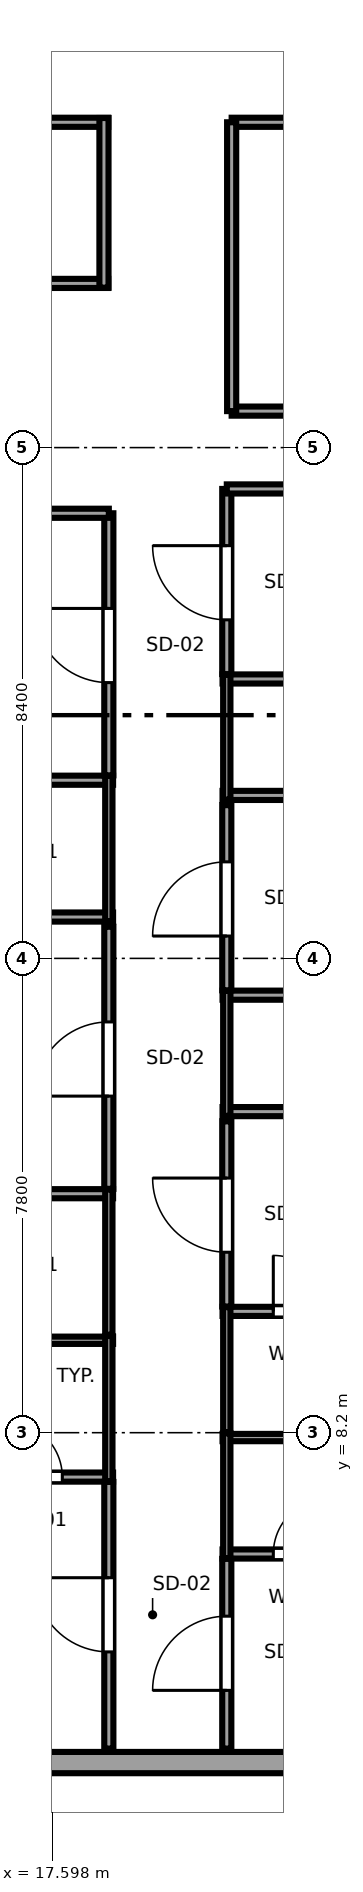
"""IFC4 building model, lengths in metres.
Left out: names, types, materials, properties, quantities, classifications, styles, units other than length and angle.
Written with IfcOpenShell. Run it as: python <this file> out.ifc"""

import sys

from ifc_helpers import new_model, si_unit, direction, frame, frame_2d, origin, place, context, subcontext, project, spatial, rectangle, extrude, source, transform, mapped, element, fill, save


model = new_model("IFC4")
c1 = context("Model", 3, precision=1e-05, world=origin(), true_north=direction((0.0, 1.0)))
c2 = subcontext(c1, "Body", "Model", "MODEL_VIEW")
j1 = project(units=[si_unit("LENGTHUNIT", "METRE"), si_unit("PLANEANGLEUNIT", "RADIAN")], contexts=[c1])
p1 = place(None, origin())
s1 = spatial("IfcSite", under=j1, at=p1, CompositionType="ELEMENT")
p2 = place(p1, origin())
s2 = spatial("IfcBuilding", under=s1, at=p2, CompositionType="ELEMENT")
p3 = place(p2, frame((0.0, 0.0, 231.0)))
s3 = spatial("IfcBuildingStorey", under=s2, at=p3, CompositionType="ELEMENT", Elevation=231.0)
p4 = place(p3, frame((7.017, 2.775, 0.0), z_axis=(0.0, 0.0, 1.0), x_axis=(1.0, 0.0, 0.0)))
e1 = element("IfcWall", 1, at=p4, inside=s3, PredefinedType="SOLIDWALL", context=c2, shape_type="SweptSolid", body=[
    extrude(rectangle(XDim=28.366, YDim=0.35, at=frame_2d((14.183, 0.0))), origin(), (0.0, 0.0, 1.0), 3.37),
])
p5 = place(p4, frame((1.514, 0.0, 0.68)))
e2 = element("IfcOpeningElement", 2, at=p5, cuts=e1, PredefinedType="OPENING", context=c2, shape_type="SweptSolid", body=[
    extrude(rectangle(XDim=2.7, YDim=1.95, at=frame_2d((1.35, 0.975))), frame((0.0, 0.185, 0.0), z_axis=(0.0, -1.0, 0.0), x_axis=(1.0, 0.0, 0.0)), (0.0, 0.0, 1.0), 0.37),
])
p6 = place(p4, frame((15.647, 0.0, 0.68)))
e3 = element("IfcOpeningElement", 3, at=p6, cuts=e1, PredefinedType="OPENING", context=c2, shape_type="SweptSolid", body=[
    extrude(rectangle(XDim=2.7, YDim=1.95, at=frame_2d((1.35, 0.975))), frame((0.0, 0.185, 0.0), z_axis=(0.0, -1.0, 0.0), x_axis=(1.0, 0.0, 0.0)), (0.0, 0.0, 1.0), 0.37),
])
p7 = place(p4, frame((24.152, 0.0, 0.68)))
e4 = element("IfcOpeningElement", 4, at=p7, cuts=e1, PredefinedType="OPENING", context=c2, shape_type="SweptSolid", body=[
    extrude(rectangle(XDim=2.7, YDim=1.95, at=frame_2d((1.35, 0.975))), frame((0.0, 0.185, 0.0), z_axis=(0.0, -1.0, 0.0), x_axis=(1.0, 0.0, 0.0)), (0.0, 0.0, 1.0), 0.37),
])
p8 = place(p3, frame((16.01, 7.47, 0.0), z_axis=(0.0, 0.0, 1.0), x_axis=(1.0, 0.0, 0.0)))
e5 = element("IfcWall", 5, at=p8, inside=s3, PredefinedType="PARTITIONING", context=c2, shape_type="SweptSolid", body=[
    extrude(rectangle(XDim=2.59, YDim=0.15, at=frame_2d((1.295, 0.0))), origin(), (0.0, 0.0, 1.0), 3.37),
])
p9 = place(p8, frame((0.835, 0.0, 0.0)))
e6 = element("IfcOpeningElement", 6, at=p9, cuts=e5, PredefinedType="OPENING", context=c2, shape_type="SweptSolid", body=[
    extrude(rectangle(XDim=0.92, YDim=2.01, at=frame_2d((0.46, 1.005))), frame((0.0, 0.085, 0.0), z_axis=(0.0, -1.0, 0.0), x_axis=(1.0, 0.0, 0.0)), (0.0, 0.0, 1.0), 0.17),
])
p10 = place(p3, frame((16.01, 9.72, 0.0), z_axis=(0.0, 0.0, 1.0), x_axis=(1.0, 0.0, 0.0)))
e7 = element("IfcWall", 7, at=p10, inside=s3, PredefinedType="PLUMBINGWALL", context=c2, shape_type="SweptSolid", body=[
    extrude(rectangle(XDim=2.59, YDim=0.12, at=frame_2d((1.295, 0.0))), origin(), (0.0, 0.0, 1.0), 3.37),
])
p11 = place(p3, frame((18.53, 7.4, 0.0), z_axis=(0.0, 0.0, 1.0), x_axis=(0.0, 1.0, 0.0)))
e8 = element("IfcWall", 8, at=p11, inside=s3, PredefinedType="PLUMBINGWALL", context=c2, shape_type="SweptSolid", body=[
    extrude(rectangle(XDim=2.39, YDim=0.12, at=frame_2d((1.195, 0.0))), origin(), (0.0, 0.0, 1.0), 3.37),
])
p12 = place(p3, frame((16.01, 12.13, 0.0), z_axis=(0.0, 0.0, 1.0), x_axis=(1.0, 0.0, 0.0)))
e9 = element("IfcWall", 9, at=p12, inside=s3, PredefinedType="PARTITIONING", context=c2, shape_type="SweptSolid", body=[
    extrude(rectangle(XDim=2.59, YDim=0.15, at=frame_2d((1.295, 0.0))), origin(), (0.0, 0.0, 1.0), 3.37),
])
p13 = place(p3, frame((18.53, 9.81, 0.0), z_axis=(0.0, 0.0, 1.0), x_axis=(0.0, 1.0, 0.0)))
e10 = element("IfcWall", 10, at=p13, inside=s3, PredefinedType="PLUMBINGWALL", context=c2, shape_type="SweptSolid", body=[
    extrude(rectangle(XDim=2.39, YDim=0.12, at=frame_2d((1.195, 0.0))), origin(), (0.0, 0.0, 1.0), 3.37),
])
p14 = place(p3, frame((3.005, 16.68, 0.0), z_axis=(0.0, 0.0, 1.0), x_axis=(1.0, 0.0, 0.0)))
e11 = element("IfcWall", 11, at=p14, inside=s3, PredefinedType="PARTITIONING", context=c2, shape_type="SweptSolid", body=[
    extrude(rectangle(XDim=15.595, YDim=0.15, at=frame_2d((7.798, 0.0))), origin(), (0.0, 0.0, 1.0), 3.37),
])
p15 = place(p3, frame((16.01, 18.93, 0.0), z_axis=(0.0, 0.0, 1.0), x_axis=(1.0, 0.0, 0.0)))
e12 = element("IfcWall", 12, at=p15, inside=s3, PredefinedType="PARTITIONING", context=c2, shape_type="SweptSolid", body=[
    extrude(rectangle(XDim=2.59, YDim=0.15, at=frame_2d((1.295, 0.0))), origin(), (0.0, 0.0, 1.0), 3.37),
])
p16 = place(p3, frame((18.53, 16.61, 0.0), z_axis=(0.0, 0.0, 1.0), x_axis=(0.0, 1.0, 0.0)))
e13 = element("IfcWall", 13, at=p16, inside=s3, PredefinedType="PLUMBINGWALL", context=c2, shape_type="SweptSolid", body=[
    extrude(rectangle(XDim=2.39, YDim=0.12, at=frame_2d((1.195, 0.0))), origin(), (0.0, 0.0, 1.0), 3.37),
])
p17 = place(p3, frame((20.4, 6.205, 0.0), z_axis=(0.0, 0.0, 1.0), x_axis=(1.0, 0.0, 0.0)))
e14 = element("IfcWall", 14, at=p17, inside=s3, PredefinedType="PARTITIONING", context=c2, shape_type="SweptSolid", body=[
    extrude(rectangle(XDim=2.59, YDim=0.15, at=frame_2d((1.295, 0.0))), origin(), (0.0, 0.0, 1.0), 3.37),
])
p18 = place(p17, frame((0.835, 0.0, 0.0)))
e15 = element("IfcOpeningElement", 15, at=p18, cuts=e14, PredefinedType="OPENING", context=c2, shape_type="SweptSolid", body=[
    extrude(rectangle(XDim=0.92, YDim=2.01, at=frame_2d((0.46, 1.005))), frame((0.0, 0.085, 0.0), z_axis=(0.0, -1.0, 0.0), x_axis=(1.0, 0.0, 0.0)), (0.0, 0.0, 1.0), 0.17),
])
p19 = place(p3, frame((20.4, 8.12, 0.0), z_axis=(0.0, 0.0, 1.0), x_axis=(1.0, 0.0, 0.0)))
e16 = element("IfcWall", 16, at=p19, inside=s3, PredefinedType="PLUMBINGWALL", context=c2, shape_type="SweptSolid", body=[
    extrude(rectangle(XDim=2.59, YDim=0.12, at=frame_2d((1.295, 0.0))), origin(), (0.0, 0.0, 1.0), 2.758),
])
p20 = place(p3, frame((20.47, 6.135, 0.0), z_axis=(0.0, 0.0, 1.0), x_axis=(0.0, 1.0, 0.0)))
e17 = element("IfcWall", 17, at=p20, inside=s3, PredefinedType="PLUMBINGWALL", context=c2, shape_type="SweptSolid", body=[
    extrude(rectangle(XDim=2.055, YDim=0.12, at=frame_2d((1.027, 0.0))), origin(), (0.0, 0.0, 1.0), 3.37),
])
p21 = place(p3, frame((20.4, 10.195, 0.0), z_axis=(0.0, 0.0, 1.0), x_axis=(1.0, 0.0, 0.0)))
e18 = element("IfcWall", 18, at=p21, inside=s3, PredefinedType="PARTITIONING", context=c2, shape_type="SweptSolid", body=[
    extrude(rectangle(XDim=2.59, YDim=0.15, at=frame_2d((1.295, 0.0))), origin(), (0.0, 0.0, 1.0), 3.37),
])
p22 = place(p21, frame((0.835, 0.0, 0.0)))
e19 = element("IfcOpeningElement", 19, at=p22, cuts=e18, PredefinedType="OPENING", context=c2, shape_type="SweptSolid", body=[
    extrude(rectangle(XDim=0.92, YDim=2.01, at=frame_2d((0.46, 1.005))), frame((0.0, 0.085, 0.0), z_axis=(0.0, -1.0, 0.0), x_axis=(1.0, 0.0, 0.0)), (0.0, 0.0, 1.0), 0.17),
])
p23 = place(p3, frame((20.47, 8.21, 0.0), z_axis=(0.0, 0.0, 1.0), x_axis=(0.0, 1.0, 0.0)))
e20 = element("IfcWall", 20, at=p23, inside=s3, PredefinedType="PLUMBINGWALL", context=c2, shape_type="SweptSolid", body=[
    extrude(rectangle(XDim=2.055, YDim=0.12, at=frame_2d((1.027, 0.0))), origin(), (0.0, 0.0, 1.0), 3.37),
])
p24 = place(p3, frame((20.4, 13.48, 0.0), z_axis=(0.0, 0.0, 1.0), x_axis=(1.0, 0.0, 0.0)))
e21 = element("IfcWall", 21, at=p24, inside=s3, PredefinedType="PARTITIONING", context=c2, shape_type="SweptSolid", body=[
    extrude(rectangle(XDim=18.995, YDim=0.15, at=frame_2d((9.498, 0.0))), origin(), (0.0, 0.0, 1.0), 3.37),
])
p25 = place(p3, frame((20.4, 15.395, 0.0), z_axis=(0.0, 0.0, 1.0), x_axis=(1.0, 0.0, 0.0)))
e22 = element("IfcWall", 22, at=p25, inside=s3, PredefinedType="PARTITIONING", context=c2, shape_type="SweptSolid", body=[
    extrude(rectangle(XDim=2.59, YDim=0.15, at=frame_2d((1.295, 0.0))), origin(), (0.0, 0.0, 1.0), 3.37),
])
p26 = place(p3, frame((20.47, 13.41, 0.0), z_axis=(0.0, 0.0, 1.0), x_axis=(0.0, 1.0, 0.0)))
e23 = element("IfcWall", 23, at=p26, inside=s3, PredefinedType="PLUMBINGWALL", context=c2, shape_type="SweptSolid", body=[
    extrude(rectangle(XDim=2.055, YDim=0.12, at=frame_2d((1.028, 0.0))), origin(), (0.0, 0.0, 1.0), 3.37),
])
p27 = place(p3, frame((20.4, 18.68, 0.0), z_axis=(0.0, 0.0, 1.0), x_axis=(1.0, 0.0, 0.0)))
e24 = element("IfcWall", 24, at=p27, inside=s3, PredefinedType="PARTITIONING", context=c2, shape_type="SweptSolid", body=[
    extrude(rectangle(XDim=18.995, YDim=0.15, at=frame_2d((9.498, 0.0))), origin(), (0.0, 0.0, 1.0), 3.37),
])
p28 = place(p3, frame((20.4, 20.595, 0.0), z_axis=(0.0, 0.0, 1.0), x_axis=(1.0, 0.0, 0.0)))
e25 = element("IfcWall", 25, at=p28, inside=s3, PredefinedType="PARTITIONING", context=c2, shape_type="SweptSolid", body=[
    extrude(rectangle(XDim=2.59, YDim=0.15, at=frame_2d((1.295, 0.0))), origin(), (0.0, 0.0, 1.0), 3.37),
])
p29 = place(p3, frame((20.47, 18.61, 0.0), z_axis=(0.0, 0.0, 1.0), x_axis=(0.0, 1.0, 0.0)))
e26 = element("IfcWall", 26, at=p29, inside=s3, PredefinedType="PLUMBINGWALL", context=c2, shape_type="SweptSolid", body=[
    extrude(rectangle(XDim=2.055, YDim=0.12, at=frame_2d((1.027, 0.0))), origin(), (0.0, 0.0, 1.0), 3.37),
])
p30 = place(p3, frame((18.53, 3.005, 0.0), z_axis=(0.0, 0.0, 1.0), x_axis=(0.0, 1.0, 0.0)))
e27 = element("IfcWall", 27, at=p30, inside=s3, PredefinedType="PARTITIONING", context=c2, shape_type="SweptSolid", body=[
    extrude(rectangle(XDim=4.385, YDim=0.15, at=frame_2d((2.192, 0.0))), origin(), (0.0, 0.0, 1.0), 3.37),
])
p31 = place(p30, frame((1.59, 0.0, 0.0)))
e28 = element("IfcOpeningElement", 28, at=p31, cuts=e27, PredefinedType="OPENING", context=c2, shape_type="SweptSolid", body=[
    extrude(rectangle(XDim=1.22, YDim=2.08, at=frame_2d((0.61, 1.04))), frame((0.0, 0.085, 0.0), z_axis=(0.0, -1.0, 0.0), x_axis=(1.0, 0.0, 0.0)), (0.0, 0.0, 1.0), 0.17),
])
p32 = place(p3, frame((18.53, 12.21, 0.0), z_axis=(0.0, 0.0, 1.0), x_axis=(0.0, 1.0, 0.0)))
e29 = element("IfcWall", 29, at=p32, inside=s3, PredefinedType="PARTITIONING", context=c2, shape_type="SweptSolid", body=[
    extrude(rectangle(XDim=4.31, YDim=0.15, at=frame_2d((2.155, 0.0))), origin(), (0.0, 0.0, 1.0), 3.37),
])
p33 = place(p32, frame((1.525, 0.0, 0.0)))
e30 = element("IfcOpeningElement", 30, at=p33, cuts=e29, PredefinedType="OPENING", context=c2, shape_type="SweptSolid", body=[
    extrude(rectangle(XDim=1.22, YDim=2.08, at=frame_2d((0.61, 1.04))), frame((0.0, 0.085, 0.0), z_axis=(0.0, -1.0, 0.0), x_axis=(1.0, 0.0, 0.0)), (0.0, 0.0, 1.0), 0.17),
])
p34 = place(p3, frame((18.53, 19.01, 0.0), z_axis=(0.0, 0.0, 1.0), x_axis=(0.0, 1.0, 0.0)))
e31 = element("IfcWall", 31, at=p34, inside=s3, PredefinedType="PARTITIONING", context=c2, shape_type="SweptSolid", body=[
    extrude(rectangle(XDim=4.31, YDim=0.15, at=frame_2d((2.155, 0.0))), origin(), (0.0, 0.0, 1.0), 3.37),
])
p35 = place(p34, frame((1.525, 0.0, 0.0)))
e32 = element("IfcOpeningElement", 32, at=p35, cuts=e31, PredefinedType="OPENING", context=c2, shape_type="SweptSolid", body=[
    extrude(rectangle(XDim=1.22, YDim=2.08, at=frame_2d((0.61, 1.04))), frame((0.0, 0.085, 0.0), z_axis=(0.0, -1.0, 0.0), x_axis=(1.0, 0.0, 0.0)), (0.0, 0.0, 1.0), 0.17),
])
p36 = place(p3, frame((3.005, 23.32, 0.0), z_axis=(0.0, 0.0, 1.0), x_axis=(1.0, 0.0, 0.0)))
e33 = element("IfcWall", 33, at=p36, inside=s3, PredefinedType="PARTITIONING", context=c2, shape_type="SweptSolid", body=[
    extrude(rectangle(XDim=15.525, YDim=0.15, at=frame_2d((7.763, 0.0))), origin(), (0.0, 0.0, 1.0), 3.37),
])
p37 = place(p3, frame((20.47, 3.005, 0.0), z_axis=(0.0, 0.0, 1.0), x_axis=(0.0, 1.0, 0.0)))
e34 = element("IfcWall", 34, at=p37, inside=s3, PredefinedType="PARTITIONING", context=c2, shape_type="SweptSolid", body=[
    extrude(rectangle(XDim=3.12, YDim=0.15, at=frame_2d((1.56, 0.0))), origin(), (0.0, 0.0, 1.0), 3.37),
])
p38 = place(p37, frame((0.958, 0.0, 0.0)))
e35 = element("IfcOpeningElement", 35, at=p38, cuts=e34, PredefinedType="OPENING", context=c2, shape_type="SweptSolid", body=[
    extrude(rectangle(XDim=1.22, YDim=2.08, at=frame_2d((0.61, 1.04))), frame((0.0, 0.085, 0.0), z_axis=(0.0, -1.0, 0.0), x_axis=(1.0, 0.0, 0.0)), (0.0, 0.0, 1.0), 0.17),
])
p39 = place(p3, frame((20.47, 10.275, 0.0), z_axis=(0.0, 0.0, 1.0), x_axis=(0.0, 1.0, 0.0)))
e36 = element("IfcWall", 36, at=p39, inside=s3, PredefinedType="PARTITIONING", context=c2, shape_type="SweptSolid", body=[
    extrude(rectangle(XDim=3.045, YDim=0.15, at=frame_2d((1.522, 0.0))), origin(), (0.0, 0.0, 1.0), 3.37),
])
p40 = place(p39, frame((0.893, 0.0, 0.0)))
e37 = element("IfcOpeningElement", 37, at=p40, cuts=e36, PredefinedType="OPENING", context=c2, shape_type="SweptSolid", body=[
    extrude(rectangle(XDim=1.22, YDim=2.08, at=frame_2d((0.61, 1.04))), frame((0.0, 0.085, 0.0), z_axis=(0.0, -1.0, 0.0), x_axis=(1.0, 0.0, 0.0)), (0.0, 0.0, 1.0), 0.17),
])
p41 = place(p3, frame((20.47, 15.475, 0.0), z_axis=(0.0, 0.0, 1.0), x_axis=(0.0, 1.0, 0.0)))
e38 = element("IfcWall", 38, at=p41, inside=s3, PredefinedType="PARTITIONING", context=c2, shape_type="SweptSolid", body=[
    extrude(rectangle(XDim=3.045, YDim=0.15, at=frame_2d((1.522, 0.0))), origin(), (0.0, 0.0, 1.0), 3.37),
])
p42 = place(p41, frame((0.893, 0.0, 0.0)))
e39 = element("IfcOpeningElement", 39, at=p42, cuts=e38, PredefinedType="OPENING", context=c2, shape_type="SweptSolid", body=[
    extrude(rectangle(XDim=1.22, YDim=2.08, at=frame_2d((0.61, 1.04))), frame((0.0, 0.085, 0.0), z_axis=(0.0, -1.0, 0.0), x_axis=(1.0, 0.0, 0.0)), (0.0, 0.0, 1.0), 0.17),
])
p43 = place(p3, frame((20.47, 20.675, 0.0), z_axis=(0.0, 0.0, 1.0), x_axis=(0.0, 1.0, 0.0)))
e40 = element("IfcWall", 40, at=p43, inside=s3, PredefinedType="PARTITIONING", context=c2, shape_type="SweptSolid", body=[
    extrude(rectangle(XDim=3.045, YDim=0.15, at=frame_2d((1.522, 0.0))), origin(), (0.0, 0.0, 1.0), 3.37),
])
p44 = place(p43, frame((0.893, 0.0, 0.0)))
e41 = element("IfcOpeningElement", 41, at=p44, cuts=e40, PredefinedType="OPENING", context=c2, shape_type="SweptSolid", body=[
    extrude(rectangle(XDim=1.22, YDim=2.08, at=frame_2d((0.61, 1.04))), frame((0.0, 0.085, 0.0), z_axis=(0.0, -1.0, 0.0), x_axis=(1.0, 0.0, 0.0)), (0.0, 0.0, 1.0), 0.17),
])
p45 = place(p3, frame((20.47, 23.72, 0.0), z_axis=(0.0, 0.0, 1.0), x_axis=(1.0, 0.0, 0.0)))
e42 = element("IfcWall", 42, at=p45, inside=s3, PredefinedType="PARTITIONING", context=c2, shape_type="SweptSolid", body=[
    extrude(rectangle(XDim=18.925, YDim=0.15, at=frame_2d((9.462, 0.0))), origin(), (0.0, 0.0, 1.0), 3.37),
])
p46 = place(p3, frame((9.93, 27.1, 0.0), z_axis=(0.0, 0.0, 1.0), x_axis=(1.0, 0.0, 0.0)))
e43 = element("IfcWall", 43, at=p46, inside=s3, PredefinedType="PARTITIONING", context=c2, shape_type="SweptSolid", body=[
    extrude(rectangle(XDim=8.59, YDim=0.15, at=frame_2d((4.295, 0.0))), origin(), (0.0, 0.0, 1.0), 3.37),
])
p47 = place(p3, frame((9.93, 29.75, 0.0), z_axis=(0.0, 0.0, 1.0), x_axis=(1.0, 0.0, 0.0)))
e44 = element("IfcWall", 44, at=p47, inside=s3, PredefinedType="PARTITIONING", context=c2, shape_type="SweptSolid", body=[
    extrude(rectangle(XDim=8.59, YDim=0.15, at=frame_2d((4.295, 0.0))), origin(), (0.0, 0.0, 1.0), 3.37),
])
p48 = place(p47, frame((3.835, 0.0, 0.0)))
e45 = element("IfcOpeningElement", 45, at=p48, cuts=e44, PredefinedType="OPENING", context=c2, shape_type="SweptSolid", body=[
    extrude(rectangle(XDim=0.92, YDim=2.01, at=frame_2d((0.46, 1.005))), frame((0.0, 0.085, 0.0), z_axis=(0.0, -1.0, 0.0), x_axis=(1.0, 0.0, 0.0)), (0.0, 0.0, 1.0), 0.17),
])
p49 = place(p3, frame((18.45, 27.03, 0.0), z_axis=(0.0, 0.0, 1.0), x_axis=(0.0, 1.0, 0.0)))
e46 = element("IfcWall", 46, at=p49, inside=s3, PredefinedType="PARTITIONING", context=c2, shape_type="SweptSolid", body=[
    extrude(rectangle(XDim=2.79, YDim=0.15, at=frame_2d((1.395, 0.0))), origin(), (0.0, 0.0, 1.0), 3.37),
])
p50 = place(p3, frame((20.55, 25.0, 0.0), z_axis=(0.0, 0.0, 1.0), x_axis=(1.0, 0.0, 0.0)))
e47 = element("IfcWall", 47, at=p50, inside=s3, PredefinedType="PARTITIONING", context=c2, shape_type="SweptSolid", body=[
    extrude(rectangle(XDim=7.85, YDim=0.15, at=frame_2d((3.925, 0.0))), origin(), (0.0, 0.0, 1.0), 3.37),
])
p51 = place(p3, frame((20.55, 29.75, 0.0), z_axis=(0.0, 0.0, 1.0), x_axis=(1.0, 0.0, 0.0)))
e48 = element("IfcWall", 48, at=p51, inside=s3, PredefinedType="PARTITIONING", context=c2, shape_type="SweptSolid", body=[
    extrude(rectangle(XDim=7.85, YDim=0.15, at=frame_2d((3.925, 0.0))), origin(), (0.0, 0.0, 1.0), 3.37),
])
p52 = place(p51, frame((3.1, 0.0, 0.0)))
e49 = element("IfcOpeningElement", 49, at=p52, cuts=e48, PredefinedType="OPENING", context=c2, shape_type="SweptSolid", body=[
    extrude(rectangle(XDim=1.65, YDim=2.15, at=frame_2d((0.825, 1.075))), frame((0.0, 0.085, 0.0), z_axis=(0.0, -1.0, 0.0), x_axis=(1.0, 0.0, 0.0)), (0.0, 0.0, 1.0), 0.17),
])
p53 = place(p3, frame((20.55, 25.0, 0.0), z_axis=(0.0, 0.0, 1.0), x_axis=(0.0, 1.0, 0.0)))
e50 = element("IfcWall", 50, at=p53, inside=s3, PredefinedType="PARTITIONING", context=c2, shape_type="SweptSolid", body=[
    extrude(rectangle(XDim=4.75, YDim=0.15, at=frame_2d((2.375, 0.0))), origin(), (0.0, 0.0, 1.0), 3.37),
])
m1 = source(origin(), c2, "Body", "SweptSolid", [
    extrude(rectangle(XDim=0.92, YDim=2.01, at=frame_2d((0.46, 1.005))), frame((0.0, 0.025, 0.0), z_axis=(0.0, -1.0, 0.0), x_axis=(1.0, 0.0, 0.0)), (0.0, 0.0, 1.0), 0.05),
])
p54 = place(p9, origin())
e51 = element("IfcDoor", 51, at=p54, inside=s3, OperationType="SINGLE_SWING_LEFT", PredefinedType="DOOR", context=c2, shape_type="MappedRepresentation", body=[
    mapped(m1, transform((0.0, 0.0, 0.0), x_axis=(1.0, 0.0, 0.0), y_axis=(0.0, 1.0, 0.0), z_axis=(0.0, 0.0, 1.0), scale=1.0)),
])
fill(e6, e51)
p55 = place(p18, origin())
e52 = element("IfcDoor", 52, at=p55, inside=s3, OperationType="SINGLE_SWING_RIGHT", PredefinedType="DOOR", context=c2, shape_type="MappedRepresentation", body=[
    mapped(m1, transform((0.0, 0.0, 0.0), x_axis=(1.0, 0.0, 0.0), y_axis=(0.0, 1.0, 0.0), z_axis=(0.0, 0.0, 1.0), scale=1.0)),
])
fill(e15, e52)
p56 = place(p22, origin())
e53 = element("IfcDoor", 53, at=p56, inside=s3, OperationType="SINGLE_SWING_LEFT", PredefinedType="DOOR", context=c2, shape_type="MappedRepresentation", body=[
    mapped(m1, transform((0.0, 0.0, 0.0), x_axis=(1.0, 0.0, 0.0), y_axis=(0.0, 1.0, 0.0), z_axis=(0.0, 0.0, 1.0), scale=1.0)),
])
fill(e19, e53)
m2 = source(origin(), c2, "Body", "SweptSolid", [
    extrude(rectangle(XDim=1.22, YDim=2.08, at=frame_2d((0.61, 1.04))), frame((0.0, 0.025, 0.0), z_axis=(0.0, -1.0, 0.0), x_axis=(1.0, 0.0, 0.0)), (0.0, 0.0, 1.0), 0.05),
])
p57 = place(p31, origin())
e54 = element("IfcDoor", 54, at=p57, inside=s3, OperationType="SINGLE_SWING_RIGHT", PredefinedType="DOOR", context=c2, shape_type="MappedRepresentation", body=[
    mapped(m2, transform((0.0, 0.0, 0.0), x_axis=(1.0, 0.0, 0.0), y_axis=(0.0, 1.0, 0.0), z_axis=(0.0, 0.0, 1.0), scale=1.0)),
])
fill(e28, e54)
p58 = place(p33, origin())
e55 = element("IfcDoor", 55, at=p58, inside=s3, OperationType="SINGLE_SWING_LEFT", PredefinedType="DOOR", context=c2, shape_type="MappedRepresentation", body=[
    mapped(m2, transform((0.0, 0.0, 0.0), x_axis=(1.0, 0.0, 0.0), y_axis=(0.0, 1.0, 0.0), z_axis=(0.0, 0.0, 1.0), scale=1.0)),
])
fill(e30, e55)
p59 = place(p35, origin())
e56 = element("IfcDoor", 56, at=p59, inside=s3, OperationType="SINGLE_SWING_RIGHT", PredefinedType="DOOR", context=c2, shape_type="MappedRepresentation", body=[
    mapped(m2, transform((0.0, 0.0, 0.0), x_axis=(1.0, 0.0, 0.0), y_axis=(0.0, 1.0, 0.0), z_axis=(0.0, 0.0, 1.0), scale=1.0)),
])
fill(e32, e56)
p60 = place(p38, origin())
e57 = element("IfcDoor", 57, at=p60, inside=s3, OperationType="SINGLE_SWING_LEFT", PredefinedType="DOOR", context=c2, shape_type="MappedRepresentation", body=[
    mapped(m2, transform((0.0, 0.0, 0.0), x_axis=(1.0, 0.0, 0.0), y_axis=(0.0, 1.0, 0.0), z_axis=(0.0, 0.0, 1.0), scale=1.0)),
])
fill(e35, e57)
p61 = place(p40, origin())
e58 = element("IfcDoor", 58, at=p61, inside=s3, OperationType="SINGLE_SWING_RIGHT", PredefinedType="DOOR", context=c2, shape_type="MappedRepresentation", body=[
    mapped(m2, transform((0.0, 0.0, 0.0), x_axis=(1.0, 0.0, 0.0), y_axis=(0.0, 1.0, 0.0), z_axis=(0.0, 0.0, 1.0), scale=1.0)),
])
fill(e37, e58)
p62 = place(p42, origin())
e59 = element("IfcDoor", 59, at=p62, inside=s3, OperationType="SINGLE_SWING_LEFT", PredefinedType="DOOR", context=c2, shape_type="MappedRepresentation", body=[
    mapped(m2, transform((0.0, 0.0, 0.0), x_axis=(1.0, 0.0, 0.0), y_axis=(0.0, 1.0, 0.0), z_axis=(0.0, 0.0, 1.0), scale=1.0)),
])
fill(e39, e59)
p63 = place(p44, origin())
e60 = element("IfcDoor", 60, at=p63, inside=s3, OperationType="SINGLE_SWING_RIGHT", PredefinedType="DOOR", context=c2, shape_type="MappedRepresentation", body=[
    mapped(m2, transform((0.0, 0.0, 0.0), x_axis=(1.0, 0.0, 0.0), y_axis=(0.0, 1.0, 0.0), z_axis=(0.0, 0.0, 1.0), scale=1.0)),
])
fill(e41, e60)
save(model, sys.argv[1])
